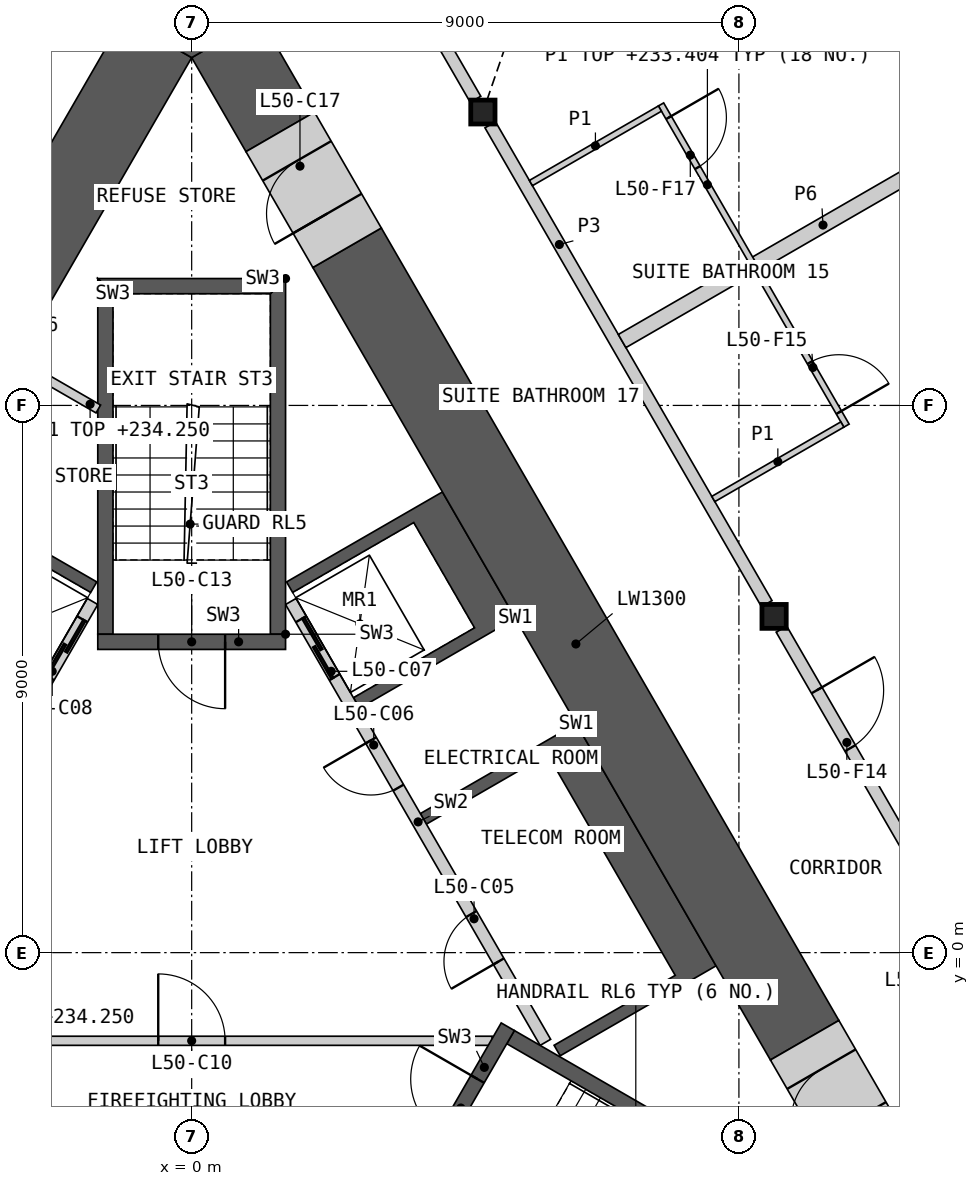
"""IFC4 building model, lengths in metres.
Left out: names, types, materials, properties, quantities, classifications, styles, units other than length and angle.
Written with IfcOpenShell. Run it as: python <this file> out.ifc"""

import sys

from ifc_helpers import new_model, si_unit, direction, frame, frame_2d, origin, origin_2d, place, context, subcontext, project, spatial, polyline, rectangle, i_section, outline, extrude, element, fill, save


model = new_model("IFC4")
c1 = context("Model", 3, precision=1e-05, world=origin(), true_north=direction((0.0, 1.0)))
c2 = subcontext(c1, "Body", "Model", "MODEL_VIEW")
j1 = project(units=[si_unit("LENGTHUNIT", "METRE"), si_unit("PLANEANGLEUNIT", "RADIAN")], contexts=[c1])
p1 = place(None, origin())
s1 = spatial("IfcSite", under=j1, at=p1, CompositionType="ELEMENT")
p2 = place(p1, origin())
s2 = spatial("IfcBuilding", under=s1, at=p2, CompositionType="ELEMENT")
p3 = place(p2, frame((0.0, 0.0, 231.0)))
s3 = spatial("IfcBuildingStorey", under=s2, at=p3, CompositionType="ELEMENT", Elevation=231.0)
for number, where, z_axis, x_axis in (
    (1, (9.578, 5.53, 0.0), (0.0, 0.0, 1.0), (1.0, 0.0, 0.0)),
    (2, (4.789, 13.825, 0.0), (0.0, 0.0, 1.0), (1.0, 0.0, 0.0)),
):
    element("IfcColumn", number, at=place(p3, frame(where, z_axis=z_axis, x_axis=x_axis)), inside=s3, PredefinedType="COLUMN", context=c2, shape_type="SweptSolid", body=[
        extrude(i_section(OverallWidth=0.399, OverallDepth=0.393, WebThickness=0.023, FlangeThickness=0.037, at=origin_2d()), origin(), (0.0, 0.0, 1.0), 3.6),
    ])
p4 = place(p3, origin())
e3 = element("IfcWall", 3, at=p4, inside=s3, PredefinedType="SHEAR", context=c2, shape_type="SweptSolid", body=[
    extrude(outline(polyline([(6.324, 3.767), (8.624, -0.217), (8.231, -0.444), (6.061, -1.697), (5.96, -1.524), (7.952, -0.374), (5.852, 3.263), (3.861, 2.113), (3.76, 2.287), (5.931, 3.54), (6.324, 3.767)])), origin(), (0.0, 0.0, 1.0), 3.25),
])
p5 = place(p3, origin())
e4 = element("IfcWall", 4, at=p5, inside=s3, PredefinedType="SHEAR", context=c2, shape_type="SweptSolid", body=[
    extrude(outline(polyline([(5.324, 5.499), (4.931, 5.272), (2.76, 4.019), (2.66, 4.192), (4.652, 5.342), (3.652, 7.074), (1.66, 5.924), (1.561, 6.097), (3.731, 7.35), (4.124, 7.577), (5.324, 5.499)])), origin(), (0.0, 0.0, 1.0), 3.25),
])
p6 = place(p3, frame((5.817, -1.476, 0.0), z_axis=(0.0, 0.0, 1.0), x_axis=(-0.500002616675, 0.866023893041, 0.0)))
e5 = element("IfcWall", 5, at=p6, inside=s3, PredefinedType="SOLIDWALL", context=c2, shape_type="SweptSolid", body=[
    extrude(rectangle(XDim=8.373, YDim=0.2, at=frame_2d((4.187, 0.0))), origin(), (0.0, 0.0, 1.0), 3.25),
])
p7 = place(p6, frame((1.537, 0.0, 0.0)))
e6 = element("IfcOpeningElement", 6, at=p7, cuts=e5, PredefinedType="OPENING", context=c2, shape_type="SweptSolid", body=[
    extrude(rectangle(XDim=0.9, YDim=2.1, at=frame_2d((0.45, 1.05))), frame((0.0, 0.11, 0.0), z_axis=(0.0, -1.0, 0.0), x_axis=(1.0, 0.0, 0.0)), (0.0, 0.0, 1.0), 0.22),
])
p8 = place(p6, frame((4.837, 0.0, 0.0)))
e7 = element("IfcOpeningElement", 7, at=p8, cuts=e5, PredefinedType="OPENING", context=c2, shape_type="SweptSolid", body=[
    extrude(rectangle(XDim=0.9, YDim=2.1, at=frame_2d((0.45, 1.05))), frame((0.0, 0.11, 0.0), z_axis=(0.0, -1.0, 0.0), x_axis=(1.0, 0.0, 0.0)), (0.0, 0.0, 1.0), 0.22),
])
p9 = place(p6, frame((6.937, 0.0, 0.0)))
e8 = element("IfcOpeningElement", 8, at=p9, cuts=e5, PredefinedType="OPENING", context=c2, shape_type="SweptSolid", body=[
    extrude(rectangle(XDim=1.1, YDim=2.1, at=frame_2d((0.55, 1.05))), frame((0.0, 0.11, 0.0), z_axis=(0.0, -1.0, 0.0), x_axis=(1.0, 0.0, 0.0)), (0.0, 0.0, 1.0), 0.22),
])
p10 = place(p3, origin())
e9 = element("IfcWall", 9, at=p10, inside=s3, PredefinedType="SHEAR", context=c2, shape_type="SweptSolid", body=[
    extrude(outline(polyline([(-7.524, 1.688), (-4.124, 7.577), (-3.731, 7.35), (-1.561, 6.097), (-1.66, 5.924), (-3.652, 7.074), (-4.652, 5.342), (-2.66, 4.192), (-2.76, 4.019), (-4.752, 5.169), (-5.752, 3.437), (-3.76, 2.287), (-3.861, 2.113), (-5.852, 3.263), (-6.852, 1.531), (-4.861, 0.381), (-4.96, 0.208), (-7.131, 1.461), (-7.524, 1.688)])), origin(), (0.0, 0.0, 1.0), 3.25),
])
p11 = place(p3, frame((-1.631, 5.776, 0.0), z_axis=(0.0, 0.0, 1.0), x_axis=(-0.499992876559, -0.866029516466, 0.0)))
e10 = element("IfcWall", 10, at=p11, inside=s3, PredefinedType="SOLIDWALL", context=c2, shape_type="SweptSolid", body=[
    extrude(rectangle(XDim=6.486, YDim=0.2, at=frame_2d((3.243, 0.0))), origin(), (0.0, 0.0, 1.0), 3.25),
])
p12 = place(p11, frame((0.337, 0.0, 0.0)))
e11 = element("IfcOpeningElement", 11, at=p12, cuts=e10, PredefinedType="OPENING", context=c2, shape_type="SweptSolid", body=[
    extrude(rectangle(XDim=1.1, YDim=2.1, at=frame_2d((0.55, 1.05))), frame((0.0, 0.11, 0.0), z_axis=(0.0, -1.0, 0.0), x_axis=(1.0, 0.0, 0.0)), (0.0, 0.0, 1.0), 0.22),
])
p13 = place(p11, frame((2.537, 0.0, 0.0)))
e12 = element("IfcOpeningElement", 12, at=p13, cuts=e10, PredefinedType="OPENING", context=c2, shape_type="SweptSolid", body=[
    extrude(rectangle(XDim=1.1, YDim=2.1, at=frame_2d((0.55, 1.05))), frame((0.0, 0.11, 0.0), z_axis=(0.0, -1.0, 0.0), x_axis=(1.0, 0.0, 0.0)), (0.0, 0.0, 1.0), 0.22),
])
p14 = place(p3, frame((-4.941, -1.45, 0.0), z_axis=(0.0, 0.0, 1.0), x_axis=(1.0, 0.0, 0.0)))
e13 = element("IfcWall", 13, at=p14, inside=s3, PredefinedType="PARTITIONING", context=c2, shape_type="SweptSolid", body=[
    extrude(rectangle(XDim=9.882, YDim=0.15, at=frame_2d((4.941, 0.0))), origin(), (0.0, 0.0, 1.0), 3.25),
])
p15 = place(p14, frame((4.391, 0.0, 0.0)))
e14 = element("IfcOpeningElement", 14, at=p15, cuts=e13, PredefinedType="OPENING", context=c2, shape_type="SweptSolid", body=[
    extrude(rectangle(XDim=1.1, YDim=2.1, at=frame_2d((0.55, 1.05))), frame((0.0, 0.085, 0.0), z_axis=(0.0, -1.0, 0.0), x_axis=(1.0, 0.0, 0.0)), (0.0, 0.0, 1.0), 0.17),
])
p16 = place(p3, origin())
e15 = element("IfcWall", 15, at=p16, inside=s3, PredefinedType="SHEAR", context=c2, shape_type="SweptSolid", body=[
    extrude(outline(polyline([(10.032, -4.298), (10.374, -4.206), (5.307, -1.281), (5.182, -1.498), (10.032, -4.298)])), origin(), (0.0, 0.0, 1.0), 3.25),
])
p17 = place(p3, frame((3.655, -3.893, 0.0), z_axis=(0.0, 0.0, 1.0), x_axis=(0.499982516597, 0.866035497597, 0.0)))
e16 = element("IfcWall", 16, at=p17, inside=s3, PredefinedType="SHEAR", context=c2, shape_type="SweptSolid", body=[
    extrude(rectangle(XDim=3.088, YDim=0.25, at=frame_2d((1.544, 0.0))), origin(), (0.0, 0.0, 1.0), 3.25),
])
p18 = place(p17, frame((0.994, 0.0, 0.0)))
e17 = element("IfcOpeningElement", 17, at=p18, cuts=e16, PredefinedType="OPENING", context=c2, shape_type="SweptSolid", body=[
    extrude(rectangle(XDim=1.1, YDim=2.1, at=frame_2d((0.55, 1.05))), frame((0.0, 0.135, 0.0), z_axis=(0.0, -1.0, 0.0), x_axis=(1.0, 0.0, 0.0)), (0.0, 0.0, 1.0), 0.27),
])
p19 = place(p3, origin())
e18 = element("IfcWall", 18, at=p19, inside=s3, PredefinedType="SHEAR", context=c2, shape_type="SweptSolid", body=[
    extrude(outline(polyline([(1.544, 5.237), (1.544, 11.087), (1.294, 10.837), (1.294, 5.237), (1.544, 5.237)])), origin(), (0.0, 0.0, 1.0), 3.25),
])
p20 = place(p3, origin())
e19 = element("IfcWall", 19, at=p20, inside=s3, PredefinedType="SHEAR", context=c2, shape_type="SweptSolid", body=[
    extrude(outline(polyline([(1.544, 11.087), (-1.544, 11.087), (-1.294, 10.837), (1.294, 10.837), (1.544, 11.087)])), origin(), (0.0, 0.0, 1.0), 3.25),
])
p21 = place(p3, origin())
e20 = element("IfcWall", 20, at=p21, inside=s3, PredefinedType="SHEAR", context=c2, shape_type="SweptSolid", body=[
    extrude(outline(polyline([(-1.294, 10.837), (-1.544, 11.087), (-1.544, 5.237), (-1.294, 5.237), (-1.294, 10.837)])), origin(), (0.0, 0.0, 1.0), 3.25),
])
p22 = place(p3, frame((1.544, 5.112, 0.0), z_axis=(0.0, 0.0, 1.0), x_axis=(-1.0, 0.0, 0.0)))
e21 = element("IfcWall", 21, at=p22, inside=s3, PredefinedType="SHEAR", context=c2, shape_type="SweptSolid", body=[
    extrude(rectangle(XDim=3.088, YDim=0.25, at=frame_2d((1.544, 0.0))), origin(), (0.0, 0.0, 1.0), 3.25),
])
p23 = place(p22, frame((0.994, 0.0, 0.0)))
e22 = element("IfcOpeningElement", 22, at=p23, cuts=e21, PredefinedType="OPENING", context=c2, shape_type="SweptSolid", body=[
    extrude(rectangle(XDim=1.1, YDim=2.1, at=frame_2d((0.55, 1.05))), frame((0.0, 0.135, 0.0), z_axis=(0.0, -1.0, 0.0), x_axis=(1.0, 0.0, 0.0)), (0.0, 0.0, 1.0), 0.27),
])
p24 = place(p3, frame((-2.886, 9.721, 0.0), z_axis=(0.0, 0.0, 1.0), x_axis=(0.865990094875, -0.500061151839, 0.0)))
e23 = element("IfcWall", 23, at=p24, inside=s3, PredefinedType="PARTITIONING", context=c2, shape_type="SweptSolid", body=[
    extrude(rectangle(XDim=1.56, YDim=0.15, at=frame_2d((0.78, 0.0))), origin(), (0.0, 0.0, 1.0), 3.25),
])
p25 = place(p3, frame((10.081, -1.441, 0.0), z_axis=(0.0, 0.0, 1.0), x_axis=(-0.500012180433, 0.866018371294, 0.0)))
e24 = element("IfcWall", 24, at=p25, inside=s3, PredefinedType="SHEAR", context=c2, shape_type="SweptSolid", body=[
    extrude(rectangle(XDim=15.05, YDim=1.3, at=frame_2d((7.525, 0.0))), origin(), (0.0, 0.0, 1.0), 3.25),
])
p26 = place(p3, frame((1.456, 13.499, 0.0), z_axis=(0.0, 0.0, 1.0), x_axis=(-0.499990639951, 0.866030807744, 0.0)))
e25 = element("IfcWall", 25, at=p26, inside=s3, PredefinedType="SHEAR", context=c2, shape_type="SweptSolid", body=[
    extrude(rectangle(XDim=1.786, YDim=1.3, at=frame_2d((0.893, 0.0))), origin(), (0.0, 0.0, 1.0), 3.25),
])
p27 = place(p3, frame((-0.563, 15.045, 0.0), z_axis=(0.0, 0.0, 1.0), x_axis=(-0.500011498138, -0.866018765229, 0.0)))
e26 = element("IfcWall", 26, at=p27, inside=s3, PredefinedType="SHEAR", context=c2, shape_type="SweptSolid", body=[
    extrude(rectangle(XDim=5.947, YDim=1.3, at=frame_2d((2.973, 0.0))), origin(), (0.0, 0.0, 1.0), 3.25),
])
p28 = place(p3, origin())
e27 = element("IfcWall", 27, at=p28, inside=s3, PredefinedType="SHEAR", context=c2, shape_type="SweptSolid", body=[
    extrude(outline(polyline([(-1.126, 15.371), (0.0, 17.321), (1.126, 15.371), (0.0, 14.72), (-1.126, 15.371)])), origin(), (0.0, 0.0, 1.0), 3.25),
])
p29 = place(p3, frame((11.181, -3.346, 0.0), z_axis=(0.0, 0.0, 1.0), x_axis=(-0.499946605688, 0.86605622881, 0.0)))
e28 = element("IfcWall", 28, at=p29, inside=s3, PredefinedType="SHEAR", context=c2, shape_type="SweptSolid", body=[
    extrude(rectangle(XDim=2.2, YDim=1.3, at=frame_2d((1.1, 0.0))), origin(), (0.0, 0.0, 1.0), 3.25),
])
p30 = place(p29, frame((0.65, 0.0, 0.0)))
e29 = element("IfcOpeningElement", 29, at=p30, cuts=e28, PredefinedType="OPENING", context=c2, shape_type="SweptSolid", body=[
    extrude(rectangle(XDim=1.0, YDim=2.1, at=frame_2d((0.5, 1.05))), frame((0.0, 0.66, 0.0), z_axis=(0.0, -1.0, 0.0), x_axis=(1.0, 0.0, 0.0)), (0.0, 0.0, 1.0), 1.32),
])
p31 = place(p3, frame((2.556, 11.593, 0.0), z_axis=(0.0, 0.0, 1.0), x_axis=(-0.499946605688, 0.86605622881, 0.0)))
e30 = element("IfcWall", 30, at=p31, inside=s3, PredefinedType="SHEAR", context=c2, shape_type="SweptSolid", body=[
    extrude(rectangle(XDim=2.2, YDim=1.3, at=frame_2d((1.1, 0.0))), origin(), (0.0, 0.0, 1.0), 3.25),
])
p32 = place(p31, frame((0.65, 0.0, 0.0)))
e31 = element("IfcOpeningElement", 31, at=p32, cuts=e30, PredefinedType="OPENING", context=c2, shape_type="SweptSolid", body=[
    extrude(rectangle(XDim=1.0, YDim=2.1, at=frame_2d((0.5, 1.05))), frame((0.0, 0.66, 0.0), z_axis=(0.0, -1.0, 0.0), x_axis=(1.0, 0.0, 0.0)), (0.0, 0.0, 1.0), 1.32),
])
p33 = place(p3, frame((9.699, 5.321, 0.0), z_axis=(0.0, 0.0, 1.0), x_axis=(0.49998193945, -0.866035830797, 0.0)))
e32 = element("IfcWall", 32, at=p33, inside=s3, PredefinedType="PARTITIONING", context=c2, shape_type="SweptSolid", body=[
    extrude(rectangle(XDim=9.094, YDim=0.2, at=frame_2d((4.547, 0.0))), origin(), (0.0, 0.0, 1.0), 3.25),
])
p34 = place(p33, frame((5.212, 0.0, 0.0)))
e33 = element("IfcOpeningElement", 33, at=p34, cuts=e32, PredefinedType="OPENING", context=c2, shape_type="SweptSolid", body=[
    extrude(rectangle(XDim=1.0, YDim=2.1, at=frame_2d((0.5, 1.05))), frame((0.0, 0.11, 0.0), z_axis=(0.0, -1.0, 0.0), x_axis=(1.0, 0.0, 0.0)), (0.0, 0.0, 1.0), 0.22),
])
p35 = place(p33, frame((1.162, 0.0, 0.0)))
e34 = element("IfcOpeningElement", 34, at=p35, cuts=e32, PredefinedType="OPENING", context=c2, shape_type="SweptSolid", body=[
    extrude(rectangle(XDim=1.1, YDim=2.1, at=frame_2d((0.55, 1.05))), frame((0.0, 0.11, 0.0), z_axis=(0.0, -1.0, 0.0), x_axis=(1.0, 0.0, 0.0)), (0.0, 0.0, 1.0), 0.22),
])
p36 = place(p3, frame((4.91, 13.616, 0.0), z_axis=(0.0, 0.0, 1.0), x_axis=(0.50000207303, -0.866024206917, 0.0)))
e35 = element("IfcWall", 35, at=p36, inside=s3, PredefinedType="PARTITIONING", context=c2, shape_type="SweptSolid", body=[
    extrude(rectangle(XDim=9.095, YDim=0.2, at=frame_2d((4.547, 0.0))), origin(), (0.0, 0.0, 1.0), 3.25),
])
p37 = place(p3, frame((7.079, 10.059, 0.0), z_axis=(0.0, 0.0, 1.0), x_axis=(0.866033195618, 0.499986503906, 0.0)))
e36 = element("IfcWall", 36, at=p37, inside=s3, PredefinedType="PARTITIONING", context=c2, shape_type="SweptSolid", body=[
    extrude(rectangle(XDim=7.63, YDim=0.25, at=frame_2d((3.815, 0.0))), origin(), (0.0, 0.0, 1.0), 2.404),
])
p38 = place(p3, frame((1.913, 18.807, 0.0), z_axis=(0.0, 0.0, 1.0), x_axis=(0.499984524817, -0.866034338201, 0.0)))
e37 = element("IfcWall", 37, at=p38, inside=s3, PredefinedType="PARTITIONING", context=c2, shape_type="SweptSolid", body=[
    extrude(rectangle(XDim=5.51, YDim=0.2, at=frame_2d((2.755, 0.0))), origin(), (0.0, 0.0, 1.0), 3.25),
])
p39 = place(p38, frame((0.35, 0.0, 0.0)))
e38 = element("IfcOpeningElement", 38, at=p39, cuts=e37, PredefinedType="OPENING", context=c2, shape_type="SweptSolid", body=[
    extrude(rectangle(XDim=1.1, YDim=2.1, at=frame_2d((0.55, 1.05))), frame((0.0, 0.11, 0.0), z_axis=(0.0, -1.0, 0.0), x_axis=(1.0, 0.0, 0.0)), (0.0, 0.0, 1.0), 0.22),
])
p40 = place(p3, frame((7.719, 13.95, 0.0), z_axis=(0.0, 0.0, 1.0), x_axis=(0.500008851346, -0.866020293397, 0.0)))
e39 = element("IfcWall", 39, at=p40, inside=s3, PredefinedType="PARTITIONING", context=c2, shape_type="SweptSolid", body=[
    extrude(rectangle(XDim=6.1, YDim=0.1, at=frame_2d((3.05, 0.0))), origin(), (0.0, 0.0, 1.0), 2.404),
])
p41 = place(p40, frame((4.9, 0.0, 0.0)))
e40 = element("IfcOpeningElement", 40, at=p41, cuts=e39, PredefinedType="OPENING", context=c2, shape_type="SweptSolid", body=[
    extrude(rectangle(XDim=0.95, YDim=2.1, at=frame_2d((0.475, 1.05))), frame((0.0, 0.06, 0.0), z_axis=(0.0, -1.0, 0.0), x_axis=(1.0, 0.0, 0.0)), (0.0, 0.0, 1.0), 0.12),
])
p42 = place(p40, frame((0.25, 0.0, 0.0)))
e41 = element("IfcOpeningElement", 41, at=p42, cuts=e39, PredefinedType="OPENING", context=c2, shape_type="SweptSolid", body=[
    extrude(rectangle(XDim=0.95, YDim=2.1, at=frame_2d((0.475, 1.05))), frame((0.0, 0.06, 0.0), z_axis=(0.0, -1.0, 0.0), x_axis=(1.0, 0.0, 0.0)), (0.0, 0.0, 1.0), 0.12),
])
p43 = place(p3, frame((8.579, 7.461, 0.0), z_axis=(0.0, 0.0, 1.0), x_axis=(0.866014668023, 0.500018594424, 0.0)))
e42 = element("IfcWall", 42, at=p43, inside=s3, PredefinedType="PARTITIONING", context=c2, shape_type="SweptSolid", body=[
    extrude(rectangle(XDim=2.45, YDim=0.1, at=frame_2d((1.225, 0.0))), origin(), (0.0, 0.0, 1.0), 2.404),
])
p44 = place(p3, frame((5.579, 12.657, 0.0), z_axis=(0.0, 0.0, 1.0), x_axis=(0.866057815567, 0.499943856944, 0.0)))
e43 = element("IfcWall", 43, at=p44, inside=s3, PredefinedType="PARTITIONING", context=c2, shape_type="SweptSolid", body=[
    extrude(rectangle(XDim=2.45, YDim=0.1, at=frame_2d((1.225, 0.0))), origin(), (0.0, 0.0, 1.0), 2.404),
])
p45 = place(p7, origin())
e44 = element("IfcDoor", 44, at=p45, inside=s3, OperationType="SINGLE_SWING_LEFT", PredefinedType="DOOR", context=c2, shape_type="SweptSolid", body=[
    extrude(rectangle(XDim=0.9, YDim=2.1, at=frame_2d((0.45, 1.05))), frame((0.0, 0.025, 0.0), z_axis=(0.0, -1.0, 0.0), x_axis=(1.0, 0.0, 0.0)), (0.0, 0.0, 1.0), 0.05),
])
fill(e6, e44)
p46 = place(p8, origin())
e45 = element("IfcDoor", 45, at=p46, inside=s3, OperationType="SINGLE_SWING_RIGHT", PredefinedType="DOOR", context=c2, shape_type="SweptSolid", body=[
    extrude(rectangle(XDim=0.9, YDim=2.1, at=frame_2d((0.45, 1.05))), frame((0.0, 0.025, 0.0), z_axis=(0.0, -1.0, 0.0), x_axis=(1.0, 0.0, 0.0)), (0.0, 0.0, 1.0), 0.05),
])
fill(e7, e45)
p47 = place(p9, origin())
e46 = element("IfcDoor", 46, at=p47, inside=s3, OperationType="SLIDING_TO_LEFT", PredefinedType="DOOR", context=c2, shape_type="SweptSolid", body=[
    extrude(rectangle(XDim=1.1, YDim=2.1, at=frame_2d((0.55, 1.05))), frame((0.0, 0.025, 0.0), z_axis=(0.0, -1.0, 0.0), x_axis=(1.0, 0.0, 0.0)), (0.0, 0.0, 1.0), 0.05),
])
fill(e8, e46)
p48 = place(p12, origin())
e47 = element("IfcDoor", 47, at=p48, inside=s3, OperationType="SLIDING_TO_LEFT", PredefinedType="DOOR", context=c2, shape_type="SweptSolid", body=[
    extrude(rectangle(XDim=1.1, YDim=2.1, at=frame_2d((0.55, 1.05))), frame((0.0, 0.025, 0.0), z_axis=(0.0, -1.0, 0.0), x_axis=(1.0, 0.0, 0.0)), (0.0, 0.0, 1.0), 0.05),
])
fill(e11, e47)
p49 = place(p15, origin())
e48 = element("IfcDoor", 48, at=p49, inside=s3, OperationType="SINGLE_SWING_LEFT", PredefinedType="DOOR", context=c2, shape_type="SweptSolid", body=[
    extrude(rectangle(XDim=1.1, YDim=2.1, at=frame_2d((0.55, 1.05))), frame((0.0, 0.025, 0.0), z_axis=(0.0, -1.0, 0.0), x_axis=(1.0, 0.0, 0.0)), (0.0, 0.0, 1.0), 0.05),
])
fill(e14, e48)
p50 = place(p18, origin())
e49 = element("IfcDoor", 49, at=p50, inside=s3, OperationType="SINGLE_SWING_RIGHT", PredefinedType="DOOR", context=c2, shape_type="SweptSolid", body=[
    extrude(rectangle(XDim=1.1, YDim=2.1, at=frame_2d((0.55, 1.05))), frame((0.0, 0.025, 0.0), z_axis=(0.0, -1.0, 0.0), x_axis=(1.0, 0.0, 0.0)), (0.0, 0.0, 1.0), 0.05),
])
fill(e17, e49)
p51 = place(p23, origin())
e50 = element("IfcDoor", 50, at=p51, inside=s3, OperationType="SINGLE_SWING_LEFT", PredefinedType="DOOR", context=c2, shape_type="SweptSolid", body=[
    extrude(rectangle(XDim=1.1, YDim=2.1, at=frame_2d((0.55, 1.05))), frame((0.0, 0.025, 0.0), z_axis=(0.0, -1.0, 0.0), x_axis=(1.0, 0.0, 0.0)), (0.0, 0.0, 1.0), 0.05),
])
fill(e22, e50)
p52 = place(p30, origin())
e51 = element("IfcDoor", 51, at=p52, inside=s3, OperationType="SINGLE_SWING_LEFT", PredefinedType="DOOR", context=c2, shape_type="SweptSolid", body=[
    extrude(rectangle(XDim=1.0, YDim=2.1, at=frame_2d((0.5, 1.05))), frame((0.0, 0.405, 0.0), z_axis=(0.0, -1.0, 0.0), x_axis=(1.0, 0.0, 0.0)), (0.0, 0.0, 1.0), 0.05),
])
fill(e29, e51)
p53 = place(p32, origin())
e52 = element("IfcDoor", 52, at=p53, inside=s3, OperationType="SINGLE_SWING_LEFT", PredefinedType="DOOR", context=c2, shape_type="SweptSolid", body=[
    extrude(rectangle(XDim=1.0, YDim=2.1, at=frame_2d((0.5, 1.05))), frame((0.0, 0.405, 0.0), z_axis=(0.0, -1.0, 0.0), x_axis=(1.0, 0.0, 0.0)), (0.0, 0.0, 1.0), 0.05),
])
fill(e31, e52)
p54 = place(p35, origin())
e53 = element("IfcDoor", 53, at=p54, inside=s3, OperationType="SINGLE_SWING_LEFT", PredefinedType="DOOR", context=c2, shape_type="SweptSolid", body=[
    extrude(rectangle(XDim=1.1, YDim=2.1, at=frame_2d((0.55, 1.05))), frame((0.0, 0.025, 0.0), z_axis=(0.0, -1.0, 0.0), x_axis=(1.0, 0.0, 0.0)), (0.0, 0.0, 1.0), 0.05),
])
fill(e34, e53)
p55 = place(p41, origin())
e54 = element("IfcDoor", 54, at=p55, inside=s3, OperationType="SINGLE_SWING_RIGHT", PredefinedType="DOOR", context=c2, shape_type="SweptSolid", body=[
    extrude(rectangle(XDim=0.95, YDim=2.1, at=frame_2d((0.475, 1.05))), frame((0.0, 0.025, 0.0), z_axis=(0.0, -1.0, 0.0), x_axis=(1.0, 0.0, 0.0)), (0.0, 0.0, 1.0), 0.05),
])
fill(e40, e54)
p56 = place(p42, origin())
e55 = element("IfcDoor", 55, at=p56, inside=s3, OperationType="SINGLE_SWING_LEFT", PredefinedType="DOOR", context=c2, shape_type="SweptSolid", body=[
    extrude(rectangle(XDim=0.95, YDim=2.1, at=frame_2d((0.475, 1.05))), frame((0.0, 0.025, 0.0), z_axis=(0.0, -1.0, 0.0), x_axis=(1.0, 0.0, 0.0)), (0.0, 0.0, 1.0), 0.05),
])
fill(e41, e55)
save(model, sys.argv[1])
